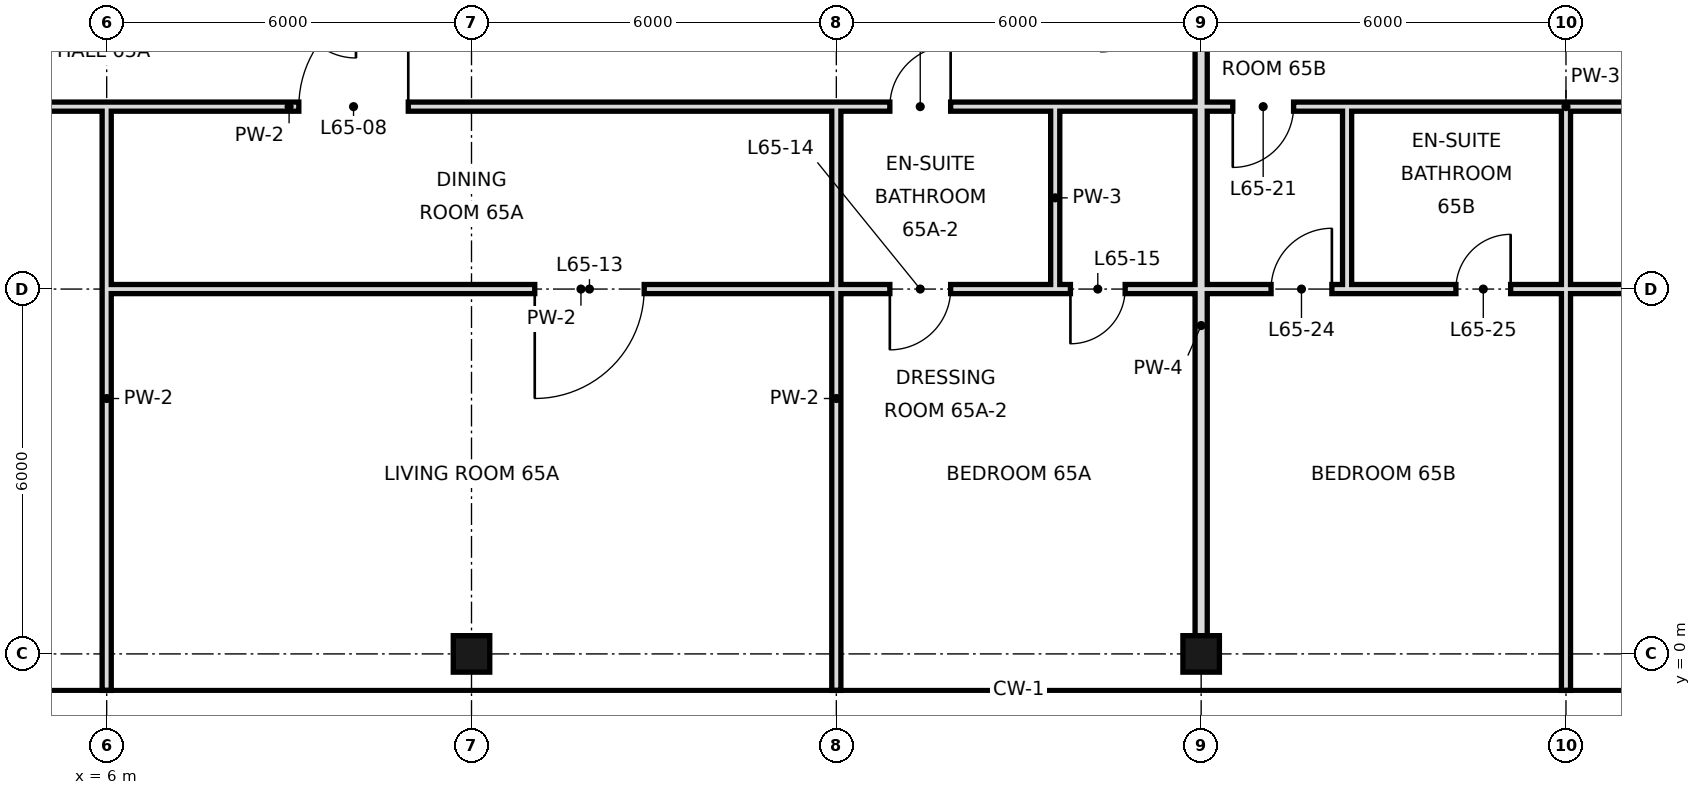
"""IFC4 building model, lengths in metres.
Left out: names, types, materials, properties, quantities, classifications, styles, units other than length and angle.
Written with IfcOpenShell. Run it as: python <this file> out.ifc"""

import sys

from ifc_helpers import new_model, si_unit, direction, frame, frame_2d, origin, origin_2d, place, context, subcontext, project, spatial, rectangle, hollow_rectangle, extrude, element, fill, save


model = new_model("IFC4")
c1 = context("Model", 3, precision=1e-05, world=origin(), true_north=direction((0.0, 1.0)))
c2 = subcontext(c1, "Body", "Model", "MODEL_VIEW")
j1 = project(units=[si_unit("LENGTHUNIT", "METRE"), si_unit("PLANEANGLEUNIT", "RADIAN")], contexts=[c1])
p1 = place(None, origin())
s1 = spatial("IfcSite", under=j1, at=p1, CompositionType="ELEMENT")
p2 = place(p1, origin())
s2 = spatial("IfcBuilding", under=s1, at=p2, CompositionType="ELEMENT")
p3 = place(p2, frame((0.0, 0.0, 273.8)))
s3 = spatial("IfcBuildingStorey", under=s2, at=p3, CompositionType="ELEMENT", Elevation=273.8)
for number, where, z_axis, x_axis in (
    (1, (12.0, 0.0, 0.0), (0.0, 0.0, 1.0), (1.0, 0.0, 0.0)),
    (2, (24.0, 0.0, 0.0), (0.0, 0.0, 1.0), (1.0, 0.0, 0.0)),
):
    element("IfcColumn", number, at=place(p3, frame(where, z_axis=z_axis, x_axis=x_axis)), inside=s3, PredefinedType="COLUMN", context=c2, shape_type="SweptSolid", body=[
        extrude(hollow_rectangle(XDim=0.6, YDim=0.6, WallThickness=0.028, at=origin_2d()), origin(), (0.0, 0.0, 1.0), 3.6),
    ])
p4 = place(p3, frame((18.0, -0.6, 0.0), z_axis=(0.0, 0.0, 1.0), x_axis=(0.0, 1.0, 0.0)))
e3 = element("IfcWall", 3, at=p4, inside=s3, PredefinedType="PARTITIONING", context=c2, shape_type="SweptSolid", body=[
    extrude(rectangle(XDim=9.6, YDim=0.15, at=frame_2d((4.8, 0.0))), origin(), (0.0, 0.0, 1.0), 2.72),
])
p5 = place(p3, frame((21.6, 6.0, 0.0), z_axis=(0.0, 0.0, 1.0), x_axis=(0.0, 1.0, 0.0)))
e4 = element("IfcWall", 4, at=p5, inside=s3, PredefinedType="PARTITIONING", context=c2, shape_type="SweptSolid", body=[
    extrude(rectangle(XDim=3.0, YDim=0.15, at=frame_2d((1.5, 0.0))), origin(), (0.0, 0.0, 1.0), 3.42),
])
p6 = place(p3, frame((24.0, 0.0, 0.0), z_axis=(0.0, 0.0, 1.0), x_axis=(0.0, 1.0, 0.0)))
e5 = element("IfcWall", 5, at=p6, inside=s3, PredefinedType="SOLIDWALL", context=c2, shape_type="SweptSolid", body=[
    extrude(rectangle(XDim=10.8, YDim=0.2, at=frame_2d((5.4, 0.0))), origin(), (0.0, 0.0, 1.0), 2.72),
])
p7 = place(p3, frame((26.4, 6.0, 0.0), z_axis=(0.0, 0.0, 1.0), x_axis=(0.0, 1.0, 0.0)))
e6 = element("IfcWall", 6, at=p7, inside=s3, PredefinedType="PARTITIONING", context=c2, shape_type="SweptSolid", body=[
    extrude(rectangle(XDim=3.0, YDim=0.15, at=frame_2d((1.5, 0.0))), origin(), (0.0, 0.0, 1.0), 3.42),
])
p8 = place(p3, frame((30.0, -0.6, 0.0), z_axis=(0.0, 0.0, 1.0), x_axis=(0.0, 1.0, 0.0)))
e7 = element("IfcWall", 7, at=p8, inside=s3, PredefinedType="PARTITIONING", context=c2, shape_type="SweptSolid", body=[
    extrude(rectangle(XDim=6.6, YDim=0.15, at=frame_2d((3.3, 0.0))), origin(), (0.0, 0.0, 1.0), 2.72),
])
p9 = place(p3, frame((30.0, 6.0, 0.0), z_axis=(0.0, 0.0, 1.0), x_axis=(0.0, 1.0, 0.0)))
e8 = element("IfcWall", 8, at=p9, inside=s3, PredefinedType="PARTITIONING", context=c2, shape_type="SweptSolid", body=[
    extrude(rectangle(XDim=3.0, YDim=0.15, at=frame_2d((1.5, 0.0))), origin(), (0.0, 0.0, 1.0), 2.72),
])
p10 = place(p3, frame((6.0, -0.6, 0.0), z_axis=(0.0, 0.0, 1.0), x_axis=(0.0, 1.0, 0.0)))
e9 = element("IfcWall", 9, at=p10, inside=s3, PredefinedType="PARTITIONING", context=c2, shape_type="SweptSolid", body=[
    extrude(rectangle(XDim=9.6, YDim=0.15, at=frame_2d((4.8, 0.0))), origin(), (0.0, 0.0, 1.0), 2.72),
])
p11 = place(p3, frame((6.0, 6.0, 0.0), z_axis=(0.0, 0.0, 1.0), x_axis=(1.0, 0.0, 0.0)))
e10 = element("IfcWall", 10, at=p11, inside=s3, PredefinedType="PARTITIONING", context=c2, shape_type="SweptSolid", body=[
    extrude(rectangle(XDim=15.6, YDim=0.15, at=frame_2d((7.8, 0.0))), origin(), (0.0, 0.0, 1.0), 2.97),
])
p12 = place(p11, frame((7.04, 0.0, 0.0)))
e11 = element("IfcOpeningElement", 11, at=p12, cuts=e10, PredefinedType="OPENING", context=c2, shape_type="SweptSolid", body=[
    extrude(rectangle(XDim=1.8, YDim=2.4, at=frame_2d((0.9, 1.2))), frame((0.0, 0.085, 0.0), z_axis=(0.0, -1.0, 0.0), x_axis=(1.0, 0.0, 0.0)), (0.0, 0.0, 1.0), 0.17),
])
p13 = place(p11, frame((12.88, 0.0, 0.0)))
e12 = element("IfcOpeningElement", 12, at=p13, cuts=e10, PredefinedType="OPENING", context=c2, shape_type="SweptSolid", body=[
    extrude(rectangle(XDim=1.0, YDim=2.4, at=frame_2d((0.5, 1.2))), frame((0.0, 0.085, 0.0), z_axis=(0.0, -1.0, 0.0), x_axis=(1.0, 0.0, 0.0)), (0.0, 0.0, 1.0), 0.17),
])
p14 = place(p3, frame((24.0, 6.0, 0.0), z_axis=(0.0, 0.0, 1.0), x_axis=(1.0, 0.0, 0.0)))
e13 = element("IfcWall", 13, at=p14, inside=s3, PredefinedType="PARTITIONING", context=c2, shape_type="SweptSolid", body=[
    extrude(rectangle(XDim=2.4, YDim=0.15, at=frame_2d((1.2, 0.0))), origin(), (0.0, 0.0, 1.0), 2.97),
])
p15 = place(p14, frame((1.15, 0.0, 0.0)))
e14 = element("IfcOpeningElement", 14, at=p15, cuts=e13, PredefinedType="OPENING", context=c2, shape_type="SweptSolid", body=[
    extrude(rectangle(XDim=1.0, YDim=2.4, at=frame_2d((0.5, 1.2))), frame((0.0, 0.085, 0.0), z_axis=(0.0, -1.0, 0.0), x_axis=(1.0, 0.0, 0.0)), (0.0, 0.0, 1.0), 0.17),
])
p16 = place(p3, frame((30.0, 6.0, 0.0), z_axis=(0.0, 0.0, 1.0), x_axis=(1.0, 0.0, 0.0)))
e15 = element("IfcWall", 15, at=p16, inside=s3, PredefinedType="PARTITIONING", context=c2, shape_type="SweptSolid", body=[
    extrude(rectangle(XDim=15.6, YDim=0.15, at=frame_2d((7.8, 0.0))), origin(), (0.0, 0.0, 1.0), 2.97),
])
p17 = place(p16, frame((3.16, 0.0, 0.0)))
e16 = element("IfcOpeningElement", 16, at=p17, cuts=e15, PredefinedType="OPENING", context=c2, shape_type="SweptSolid", body=[
    extrude(rectangle(XDim=1.8, YDim=2.4, at=frame_2d((0.9, 1.2))), frame((0.0, 0.085, 0.0), z_axis=(0.0, -1.0, 0.0), x_axis=(1.0, 0.0, 0.0)), (0.0, 0.0, 1.0), 0.17),
])
p18 = place(p16, frame((12.88, 0.0, 0.0)))
e17 = element("IfcOpeningElement", 17, at=p18, cuts=e15, PredefinedType="OPENING", context=c2, shape_type="SweptSolid", body=[
    extrude(rectangle(XDim=1.0, YDim=2.4, at=frame_2d((0.5, 1.2))), frame((0.0, 0.085, 0.0), z_axis=(0.0, -1.0, 0.0), x_axis=(1.0, 0.0, 0.0)), (0.0, 0.0, 1.0), 0.17),
])
p19 = place(p3, frame((21.6, 6.0, 0.0), z_axis=(0.0, 0.0, 1.0), x_axis=(1.0, 0.0, 0.0)))
e18 = element("IfcWall", 18, at=p19, inside=s3, PredefinedType="PARTITIONING", context=c2, shape_type="SweptSolid", body=[
    extrude(rectangle(XDim=2.4, YDim=0.15, at=frame_2d((1.2, 0.0))), origin(), (0.0, 0.0, 1.0), 2.97),
])
p20 = place(p19, frame((0.25, 0.0, 0.0)))
e19 = element("IfcOpeningElement", 19, at=p20, cuts=e18, PredefinedType="OPENING", context=c2, shape_type="SweptSolid", body=[
    extrude(rectangle(XDim=0.9, YDim=2.4, at=frame_2d((0.45, 1.2))), frame((0.0, 0.085, 0.0), z_axis=(0.0, -1.0, 0.0), x_axis=(1.0, 0.0, 0.0)), (0.0, 0.0, 1.0), 0.17),
])
p21 = place(p3, frame((26.4, 6.0, 0.0), z_axis=(0.0, 0.0, 1.0), x_axis=(1.0, 0.0, 0.0)))
e20 = element("IfcWall", 20, at=p21, inside=s3, PredefinedType="PARTITIONING", context=c2, shape_type="SweptSolid", body=[
    extrude(rectangle(XDim=3.6, YDim=0.15, at=frame_2d((1.8, 0.0))), origin(), (0.0, 0.0, 1.0), 2.97),
])
p22 = place(p21, frame((1.79, 0.0, 0.0)))
e21 = element("IfcOpeningElement", 21, at=p22, cuts=e20, PredefinedType="OPENING", context=c2, shape_type="SweptSolid", body=[
    extrude(rectangle(XDim=0.9, YDim=2.4, at=frame_2d((0.45, 1.2))), frame((0.0, 0.085, 0.0), z_axis=(0.0, -1.0, 0.0), x_axis=(1.0, 0.0, 0.0)), (0.0, 0.0, 1.0), 0.17),
])
p23 = place(p3, frame((-3.6, 9.0, 0.0), z_axis=(0.0, 0.0, 1.0), x_axis=(1.0, 0.0, 0.0)))
e22 = element("IfcWall", 22, at=p23, inside=s3, PredefinedType="PARTITIONING", context=c2, shape_type="SweptSolid", body=[
    extrude(rectangle(XDim=25.2, YDim=0.15, at=frame_2d((12.6, 0.0))), origin(), (0.0, 0.0, 1.0), 3.42),
])
p24 = place(p23, frame((1.72, 0.0, 0.0)))
e23 = element("IfcOpeningElement", 23, at=p24, cuts=e22, PredefinedType="OPENING", context=c2, shape_type="SweptSolid", body=[
    extrude(rectangle(XDim=1.0, YDim=2.4, at=frame_2d((0.5, 1.2))), frame((0.0, 0.085, 0.0), z_axis=(0.0, -1.0, 0.0), x_axis=(1.0, 0.0, 0.0)), (0.0, 0.0, 1.0), 0.17),
])
p25 = place(p23, frame((7.0, 0.0, 0.0)))
e24 = element("IfcOpeningElement", 24, at=p25, cuts=e22, PredefinedType="OPENING", context=c2, shape_type="SweptSolid", body=[
    extrude(rectangle(XDim=1.0, YDim=2.4, at=frame_2d((0.5, 1.2))), frame((0.0, 0.085, 0.0), z_axis=(0.0, -1.0, 0.0), x_axis=(1.0, 0.0, 0.0)), (0.0, 0.0, 1.0), 0.17),
])
p26 = place(p23, frame((12.76, 0.0, 0.0)))
e25 = element("IfcOpeningElement", 25, at=p26, cuts=e22, PredefinedType="OPENING", context=c2, shape_type="SweptSolid", body=[
    extrude(rectangle(XDim=1.8, YDim=2.4, at=frame_2d((0.9, 1.2))), frame((0.0, 0.085, 0.0), z_axis=(0.0, -1.0, 0.0), x_axis=(1.0, 0.0, 0.0)), (0.0, 0.0, 1.0), 0.17),
])
p27 = place(p23, frame((22.48, 0.0, 0.0)))
e26 = element("IfcOpeningElement", 26, at=p27, cuts=e22, PredefinedType="OPENING", context=c2, shape_type="SweptSolid", body=[
    extrude(rectangle(XDim=1.0, YDim=2.4, at=frame_2d((0.5, 1.2))), frame((0.0, 0.085, 0.0), z_axis=(0.0, -1.0, 0.0), x_axis=(1.0, 0.0, 0.0)), (0.0, 0.0, 1.0), 0.17),
])
p28 = place(p3, frame((24.0, 9.0, 0.0), z_axis=(0.0, 0.0, 1.0), x_axis=(1.0, 0.0, 0.0)))
e27 = element("IfcWall", 27, at=p28, inside=s3, PredefinedType="PARTITIONING", context=c2, shape_type="SweptSolid", body=[
    extrude(rectangle(XDim=2.4, YDim=0.15, at=frame_2d((1.2, 0.0))), origin(), (0.0, 0.0, 1.0), 3.42),
])
p29 = place(p28, frame((0.52, 0.0, 0.0)))
e28 = element("IfcOpeningElement", 28, at=p29, cuts=e27, PredefinedType="OPENING", context=c2, shape_type="SweptSolid", body=[
    extrude(rectangle(XDim=1.0, YDim=2.4, at=frame_2d((0.5, 1.2))), frame((0.0, 0.085, 0.0), z_axis=(0.0, -1.0, 0.0), x_axis=(1.0, 0.0, 0.0)), (0.0, 0.0, 1.0), 0.17),
])
p30 = place(p3, frame((30.0, 9.0, 0.0), z_axis=(0.0, 0.0, 1.0), x_axis=(1.0, 0.0, 0.0)))
e29 = element("IfcWall", 29, at=p30, inside=s3, PredefinedType="PARTITIONING", context=c2, shape_type="SweptSolid", body=[
    extrude(rectangle(XDim=15.6, YDim=0.15, at=frame_2d((7.8, 0.0))), origin(), (0.0, 0.0, 1.0), 3.42),
])
p31 = place(p30, frame((5.1, 0.0, 0.0)))
e30 = element("IfcOpeningElement", 30, at=p31, cuts=e29, PredefinedType="OPENING", context=c2, shape_type="SweptSolid", body=[
    extrude(rectangle(XDim=1.8, YDim=2.4, at=frame_2d((0.9, 1.2))), frame((0.0, 0.085, 0.0), z_axis=(0.0, -1.0, 0.0), x_axis=(1.0, 0.0, 0.0)), (0.0, 0.0, 1.0), 0.17),
])
p32 = place(p30, frame((13.72, 0.0, 0.0)))
e31 = element("IfcOpeningElement", 31, at=p32, cuts=e29, PredefinedType="OPENING", context=c2, shape_type="SweptSolid", body=[
    extrude(rectangle(XDim=1.0, YDim=2.4, at=frame_2d((0.5, 1.2))), frame((0.0, 0.085, 0.0), z_axis=(0.0, -1.0, 0.0), x_axis=(1.0, 0.0, 0.0)), (0.0, 0.0, 1.0), 0.17),
])
p33 = place(p3, frame((21.6, 9.0, 0.0), z_axis=(0.0, 0.0, 1.0), x_axis=(1.0, 0.0, 0.0)))
e32 = element("IfcWall", 32, at=p33, inside=s3, PredefinedType="PARTITIONING", context=c2, shape_type="SweptSolid", body=[
    extrude(rectangle(XDim=2.4, YDim=0.15, at=frame_2d((1.2, 0.0))), origin(), (0.0, 0.0, 1.0), 3.42),
])
p34 = place(p3, frame((26.4, 9.0, 0.0), z_axis=(0.0, 0.0, 1.0), x_axis=(1.0, 0.0, 0.0)))
e33 = element("IfcWall", 33, at=p34, inside=s3, PredefinedType="PARTITIONING", context=c2, shape_type="SweptSolid", body=[
    extrude(rectangle(XDim=3.6, YDim=0.15, at=frame_2d((1.8, 0.0))), origin(), (0.0, 0.0, 1.0), 3.42),
])
p35 = place(p26, frame((1.8, 0.0, 0.0), z_axis=(0.0, 0.0, 1.0), x_axis=(-1.0, 0.0, 0.0)))
e34 = element("IfcDoor", 34, at=p35, inside=s3, OperationType="SINGLE_SWING_LEFT", PredefinedType="DOOR", context=c2, shape_type="SweptSolid", body=[
    extrude(rectangle(XDim=1.8, YDim=2.4, at=frame_2d((0.9, 1.2))), frame((0.0, 0.025, 0.0), z_axis=(0.0, -1.0, 0.0), x_axis=(1.0, 0.0, 0.0)), (0.0, 0.0, 1.0), 0.05),
])
fill(e25, e34)
p36 = place(p27, frame((1.0, 0.0, 0.0), z_axis=(0.0, 0.0, 1.0), x_axis=(-1.0, 0.0, 0.0)))
e35 = element("IfcDoor", 35, at=p36, inside=s3, OperationType="SINGLE_SWING_LEFT", PredefinedType="DOOR", context=c2, shape_type="SweptSolid", body=[
    extrude(rectangle(XDim=1.0, YDim=2.4, at=frame_2d((0.5, 1.2))), frame((0.0, 0.025, 0.0), z_axis=(0.0, -1.0, 0.0), x_axis=(1.0, 0.0, 0.0)), (0.0, 0.0, 1.0), 0.05),
])
fill(e26, e35)
p37 = place(p12, frame((1.8, 0.0, 0.0), z_axis=(0.0, 0.0, 1.0), x_axis=(-1.0, 0.0, 0.0)))
e36 = element("IfcDoor", 36, at=p37, inside=s3, OperationType="SINGLE_SWING_RIGHT", PredefinedType="DOOR", context=c2, shape_type="SweptSolid", body=[
    extrude(rectangle(XDim=1.8, YDim=2.4, at=frame_2d((0.9, 1.2))), frame((0.0, 0.025, 0.0), z_axis=(0.0, -1.0, 0.0), x_axis=(1.0, 0.0, 0.0)), (0.0, 0.0, 1.0), 0.05),
])
fill(e11, e36)
p38 = place(p13, frame((1.0, 0.0, 0.0), z_axis=(0.0, 0.0, 1.0), x_axis=(-1.0, 0.0, 0.0)))
e37 = element("IfcDoor", 37, at=p38, inside=s3, OperationType="SINGLE_SWING_RIGHT", PredefinedType="DOOR", context=c2, shape_type="SweptSolid", body=[
    extrude(rectangle(XDim=1.0, YDim=2.4, at=frame_2d((0.5, 1.2))), frame((0.0, 0.025, 0.0), z_axis=(0.0, -1.0, 0.0), x_axis=(1.0, 0.0, 0.0)), (0.0, 0.0, 1.0), 0.05),
])
fill(e12, e37)
p39 = place(p20, frame((0.9, 0.0, 0.0), z_axis=(0.0, 0.0, 1.0), x_axis=(-1.0, 0.0, 0.0)))
e38 = element("IfcDoor", 38, at=p39, inside=s3, OperationType="SINGLE_SWING_RIGHT", PredefinedType="DOOR", context=c2, shape_type="SweptSolid", body=[
    extrude(rectangle(XDim=0.9, YDim=2.4, at=frame_2d((0.45, 1.2))), frame((0.0, 0.025, 0.0), z_axis=(0.0, -1.0, 0.0), x_axis=(1.0, 0.0, 0.0)), (0.0, 0.0, 1.0), 0.05),
])
fill(e19, e38)
p40 = place(p29, frame((1.0, 0.0, 0.0), z_axis=(0.0, 0.0, 1.0), x_axis=(-1.0, 0.0, 0.0)))
e39 = element("IfcDoor", 39, at=p40, inside=s3, OperationType="SINGLE_SWING_RIGHT", PredefinedType="DOOR", context=c2, shape_type="SweptSolid", body=[
    extrude(rectangle(XDim=1.0, YDim=2.4, at=frame_2d((0.5, 1.2))), frame((0.0, 0.025, 0.0), z_axis=(0.0, -1.0, 0.0), x_axis=(1.0, 0.0, 0.0)), (0.0, 0.0, 1.0), 0.05),
])
fill(e28, e39)
p41 = place(p15, frame((1.0, 0.0, 0.0), z_axis=(0.0, 0.0, 1.0), x_axis=(-1.0, 0.0, 0.0)))
e40 = element("IfcDoor", 40, at=p41, inside=s3, OperationType="SINGLE_SWING_LEFT", PredefinedType="DOOR", context=c2, shape_type="SweptSolid", body=[
    extrude(rectangle(XDim=1.0, YDim=2.4, at=frame_2d((0.5, 1.2))), frame((0.0, 0.025, 0.0), z_axis=(0.0, -1.0, 0.0), x_axis=(1.0, 0.0, 0.0)), (0.0, 0.0, 1.0), 0.05),
])
fill(e14, e40)
p42 = place(p22, frame((0.9, 0.0, 0.0), z_axis=(0.0, 0.0, 1.0), x_axis=(-1.0, 0.0, 0.0)))
e41 = element("IfcDoor", 41, at=p42, inside=s3, OperationType="SINGLE_SWING_LEFT", PredefinedType="DOOR", context=c2, shape_type="SweptSolid", body=[
    extrude(rectangle(XDim=0.9, YDim=2.4, at=frame_2d((0.45, 1.2))), frame((0.0, 0.025, 0.0), z_axis=(0.0, -1.0, 0.0), x_axis=(1.0, 0.0, 0.0)), (0.0, 0.0, 1.0), 0.05),
])
fill(e21, e41)
save(model, sys.argv[1])
